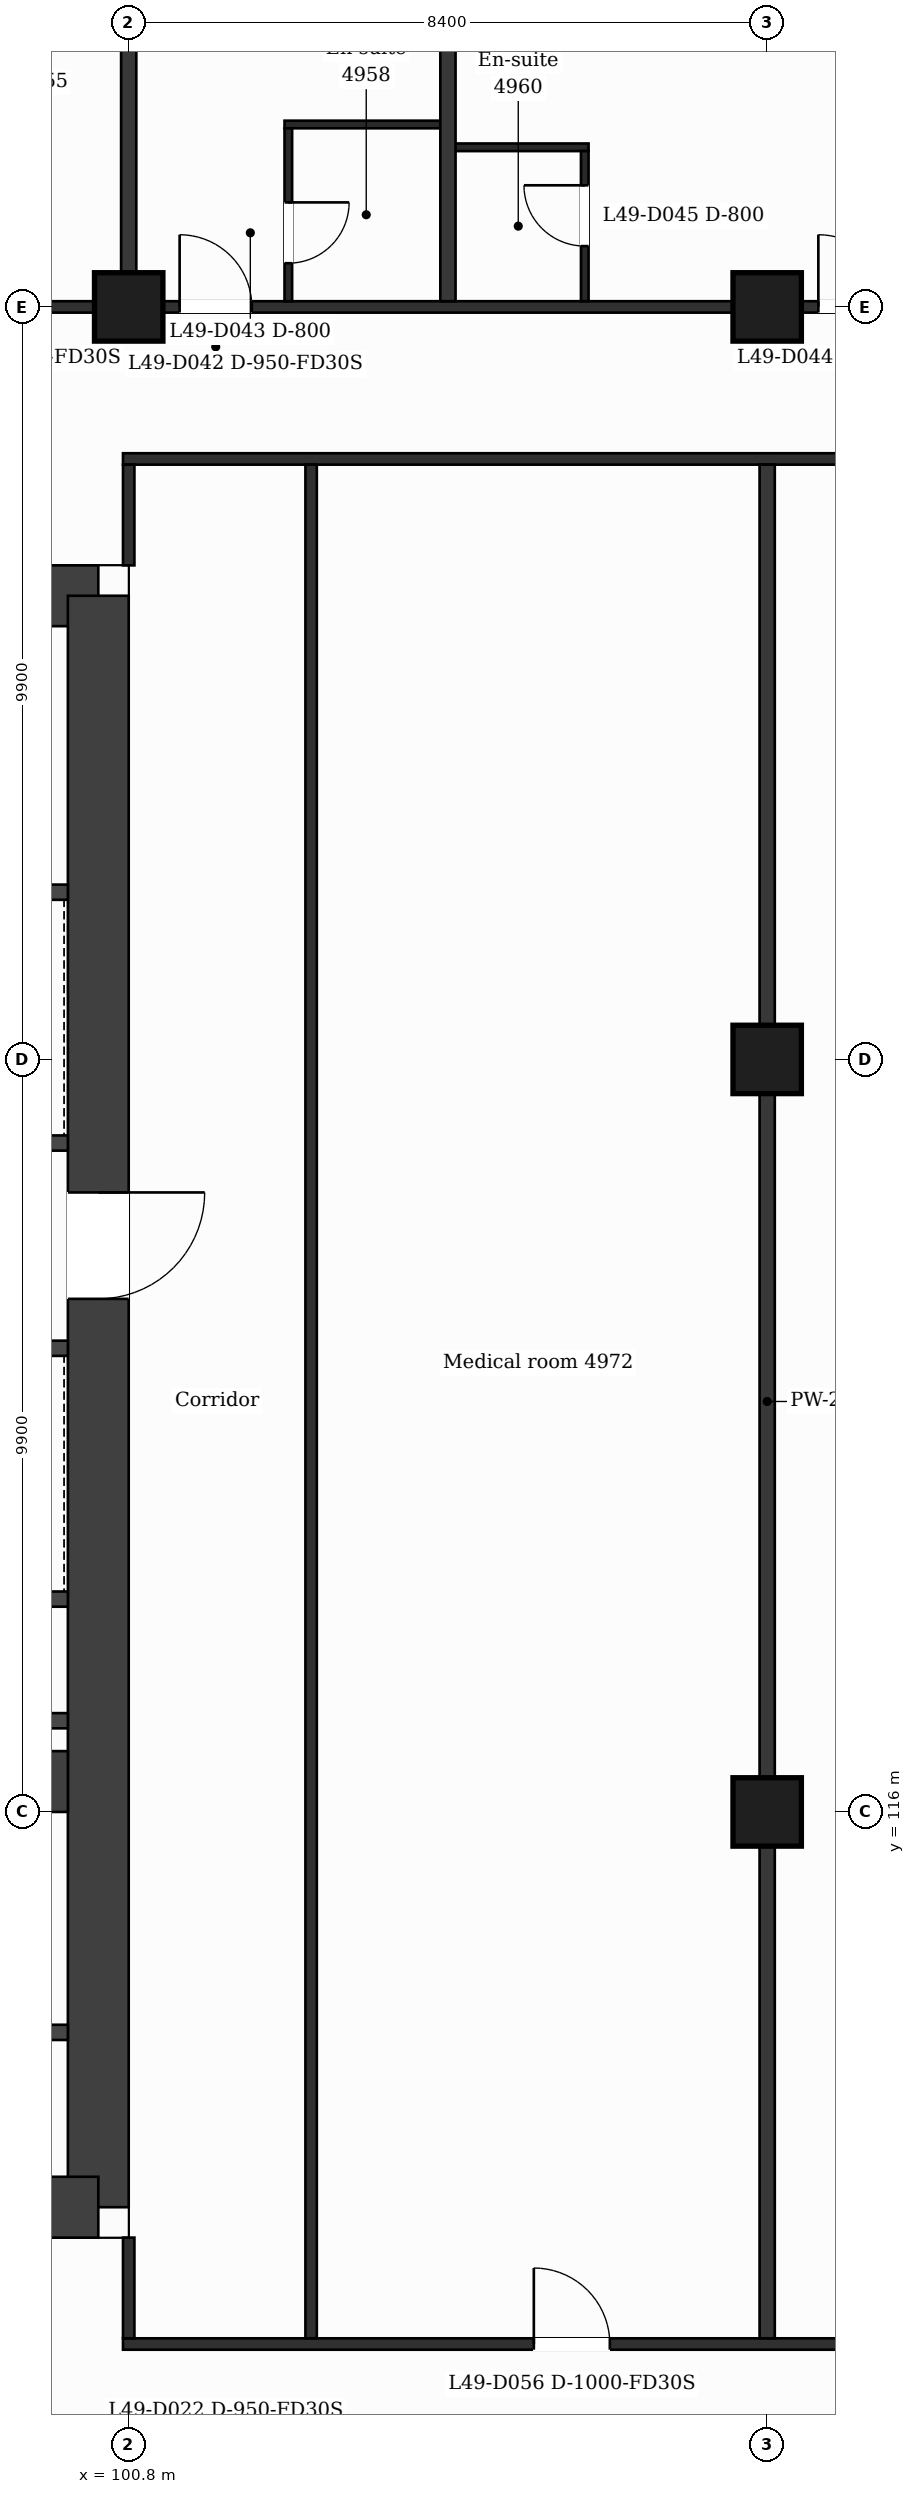
"""IFC4 building model, lengths in metres.
Left out: names, types, materials, properties, quantities, classifications, styles, units other than length and angle.
Written with IfcOpenShell. Run it as: python <this file> out.ifc"""

import sys

from ifc_helpers import new_model, si_unit, direction, frame, frame_2d, origin, origin_2d, place, context, subcontext, project, spatial, rectangle, extrude, element, fill, save


model = new_model("IFC4")
c1 = context("Model", 3, precision=1e-05, world=origin(), true_north=direction((0.0, 1.0)))
c2 = subcontext(c1, "Body", "Model", "MODEL_VIEW")
j1 = project(units=[si_unit("LENGTHUNIT", "METRE"), si_unit("PLANEANGLEUNIT", "RADIAN")], contexts=[c1])
p1 = place(None, origin())
s1 = spatial("IfcSite", under=j1, at=p1, CompositionType="ELEMENT")
p2 = place(p1, origin())
s2 = spatial("IfcBuilding", under=s1, at=p2, CompositionType="ELEMENT")
p3 = place(p2, frame((0.0, 0.0, 205.9)))
s3 = spatial("IfcBuildingStorey", under=s2, at=p3, CompositionType="ELEMENT", Elevation=205.9)
p4 = place(p3, frame((88.98, 132.0, 0.0), z_axis=(0.0, 0.0, 1.0), x_axis=(1.0, 0.0, 0.0)))
e1 = element("IfcWall", 1, at=p4, inside=s3, PredefinedType="SHEAR", context=c2, shape_type="SweptSolid", body=[
    extrude(rectangle(XDim=11.419, YDim=0.8, at=frame_2d((5.71, 0.0))), origin(), (0.0, 0.0, 1.0), 3.7),
])
p5 = place(p4, frame((6.833, 0.0, 0.0)))
e2 = element("IfcOpeningElement", 2, at=p5, cuts=e1, PredefinedType="OPENING", context=c2, shape_type="SweptSolid", body=[
    extrude(rectangle(XDim=1.2, YDim=2.1, at=frame_2d((0.6, 1.05))), frame((0.0, 0.41, 0.0), z_axis=(0.0, -1.0, 0.0), x_axis=(1.0, 0.0, 0.0)), (0.0, 0.0, 1.0), 0.82),
])
p6 = place(p3, frame((100.4, 132.0, 0.0), z_axis=(0.0, 0.0, 1.0), x_axis=(0.0, -1.0, 0.0)))
e3 = element("IfcWall", 3, at=p6, inside=s3, PredefinedType="SHEAR", context=c2, shape_type="SweptSolid", body=[
    extrude(rectangle(XDim=21.2, YDim=0.8, at=frame_2d((10.6, 0.0))), origin(), (0.0, 0.0, 1.0), 3.7),
])
p7 = place(p6, frame((7.85, 0.0, 0.0)))
e4 = element("IfcOpeningElement", 4, at=p7, cuts=e3, PredefinedType="OPENING", context=c2, shape_type="SweptSolid", body=[
    extrude(rectangle(XDim=1.4, YDim=2.1, at=frame_2d((0.7, 1.05))), frame((0.0, 0.41, 0.0), z_axis=(0.0, -1.0, 0.0), x_axis=(1.0, 0.0, 0.0)), (0.0, 0.0, 1.0), 0.82),
])
p8 = place(p3, frame((100.4, 110.8, 0.0), z_axis=(0.0, 0.0, 1.0), x_axis=(-1.0, 0.0, 0.0)))
e5 = element("IfcWall", 5, at=p8, inside=s3, PredefinedType="SHEAR", context=c2, shape_type="SweptSolid", body=[
    extrude(rectangle(XDim=14.273, YDim=0.8, at=frame_2d((7.137, 0.0))), origin(), (0.0, 0.0, 1.0), 3.7),
])
p9 = place(p8, frame((5.908, 0.0, 0.0)))
e6 = element("IfcOpeningElement", 6, at=p9, cuts=e5, PredefinedType="OPENING", context=c2, shape_type="SweptSolid", body=[
    extrude(rectangle(XDim=1.4, YDim=2.1, at=frame_2d((0.7, 1.05))), frame((0.0, 0.41, 0.0), z_axis=(0.0, -1.0, 0.0), x_axis=(1.0, 0.0, 0.0)), (0.0, 0.0, 1.0), 0.82),
])
p10 = place(p3, frame((94.7, 116.4, 0.0), z_axis=(0.0, 0.0, 1.0), x_axis=(1.0, 0.0, 0.0)))
e7 = element("IfcWall", 7, at=p10, inside=s3, PredefinedType="SHEAR", context=c2, shape_type="SweptSolid", body=[
    extrude(rectangle(XDim=5.3, YDim=0.8, at=frame_2d((2.65, 0.0))), origin(), (0.0, 0.0, 1.0), 3.7),
])
for number, where, z_axis, x_axis in (
    (8, (109.2, 116.0, 0.0), (0.0, 0.0, 1.0), (1.0, 0.0, 0.0)),
    (9, (109.2, 125.9, 0.0), (0.0, 0.0, 1.0), (1.0, 0.0, 0.0)),
    (10, (100.8, 135.8, 0.0), (0.0, 0.0, 1.0), (1.0, 0.0, 0.0)),
    (11, (109.2, 135.8, 0.0), (0.0, 0.0, 1.0), (1.0, 0.0, 0.0)),
):
    element("IfcColumn", number, at=place(p3, frame(where, z_axis=z_axis, x_axis=x_axis)), inside=s3, PredefinedType="COLUMN", context=c2, shape_type="SweptSolid", body=[
        extrude(rectangle(XDim=0.9, YDim=0.9, at=origin_2d()), origin(), (0.0, 0.0, 1.0), 3.7),
    ])
p11 = place(p3, frame((100.725, 109.0, 0.0), z_axis=(0.0, 0.0, 1.0), x_axis=(1.0, 0.0, 0.0)))
e12 = element("IfcWall", 12, at=p11, inside=s3, PredefinedType="PARTITIONING", context=c2, shape_type="SweptSolid", body=[
    extrude(rectangle(XDim=25.35, YDim=0.15, at=frame_2d((12.675, 0.0))), origin(), (0.0, 0.0, 1.0), 3.38),
])
p12 = place(p11, frame((20.55, 0.0, 0.0)))
e13 = element("IfcOpeningElement", 13, at=p12, cuts=e12, PredefinedType="OPENING", context=c2, shape_type="SweptSolid", body=[
    extrude(rectangle(XDim=1.0, YDim=2.1, at=frame_2d((0.5, 1.05))), frame((0.0, 0.085, 0.0), z_axis=(0.0, -1.0, 0.0), x_axis=(1.0, 0.0, 0.0)), (0.0, 0.0, 1.0), 0.17),
])
p13 = place(p11, frame((5.405, 0.0, 0.0)))
e14 = element("IfcOpeningElement", 14, at=p13, cuts=e12, PredefinedType="OPENING", context=c2, shape_type="SweptSolid", body=[
    extrude(rectangle(XDim=1.0, YDim=2.1, at=frame_2d((0.5, 1.05))), frame((0.0, 0.085, 0.0), z_axis=(0.0, -1.0, 0.0), x_axis=(1.0, 0.0, 0.0)), (0.0, 0.0, 1.0), 0.17),
])
p14 = place(p11, frame((12.175, 0.0, 0.0)))
e15 = element("IfcOpeningElement", 15, at=p14, cuts=e12, PredefinedType="OPENING", context=c2, shape_type="SweptSolid", body=[
    extrude(rectangle(XDim=1.0, YDim=2.1, at=frame_2d((0.5, 1.05))), frame((0.0, 0.085, 0.0), z_axis=(0.0, -1.0, 0.0), x_axis=(1.0, 0.0, 0.0)), (0.0, 0.0, 1.0), 0.17),
])
p15 = place(p11, frame((17.875, 0.0, 0.0)))
e16 = element("IfcOpeningElement", 16, at=p15, cuts=e12, PredefinedType="OPENING", context=c2, shape_type="SweptSolid", body=[
    extrude(rectangle(XDim=1.0, YDim=2.1, at=frame_2d((0.5, 1.05))), frame((0.0, 0.085, 0.0), z_axis=(0.0, -1.0, 0.0), x_axis=(1.0, 0.0, 0.0)), (0.0, 0.0, 1.0), 0.17),
])
p16 = place(p3, frame((95.127, 113.1, 0.0), z_axis=(0.0, 0.0, 1.0), x_axis=(1.0, 0.0, 0.0)))
e17 = element("IfcWall", 17, at=p16, inside=s3, PredefinedType="PARTITIONING", context=c2, shape_type="SweptSolid", body=[
    extrude(rectangle(XDim=4.873, YDim=0.2, at=frame_2d((2.437, 0.0))), origin(), (0.0, 0.0, 1.0), 3.38),
])
p17 = place(p16, frame((3.23, 0.0, 0.0)))
e18 = element("IfcOpeningElement", 18, at=p17, cuts=e17, PredefinedType="OPENING", context=c2, shape_type="SweptSolid", body=[
    extrude(rectangle(XDim=0.9, YDim=2.1, at=frame_2d((0.45, 1.05))), frame((0.0, 0.11, 0.0), z_axis=(0.0, -1.0, 0.0), x_axis=(1.0, 0.0, 0.0)), (0.0, 0.0, 1.0), 0.22),
])
for number, where, z_axis, x_axis in (
    (19, (95.227, 117.2, 0.0), (0.0, 0.0, 1.0), (1.0, 0.0, 0.0)),
    (20, (95.227, 118.8, 0.0), (0.0, 0.0, 1.0), (1.0, 0.0, 0.0)),
):
    element("IfcWall", number, at=place(p3, frame(where, z_axis=z_axis, x_axis=x_axis)), inside=s3, PredefinedType="PARTITIONING", context=c2, shape_type="SweptSolid", body=[
        extrude(rectangle(XDim=4.773, YDim=0.2, at=frame_2d((2.386, 0.0))), origin(), (0.0, 0.0, 1.0), 3.38),
    ])
p18 = place(p3, frame((95.227, 122.1, 0.0), z_axis=(0.0, 0.0, 1.0), x_axis=(1.0, 0.0, 0.0)))
e21 = element("IfcWall", 21, at=p18, inside=s3, PredefinedType="PARTITIONING", context=c2, shape_type="SweptSolid", body=[
    extrude(rectangle(XDim=4.773, YDim=0.2, at=frame_2d((2.386, 0.0))), origin(), (0.0, 0.0, 1.0), 3.38),
])
p19 = place(p18, frame((0.702, 0.0, 0.0)))
e22 = element("IfcOpeningElement", 22, at=p19, cuts=e21, PredefinedType="OPENING", context=c2, shape_type="SweptSolid", body=[
    extrude(rectangle(XDim=1.1, YDim=2.1, at=frame_2d((0.55, 1.05))), frame((0.0, 0.11, 0.0), z_axis=(0.0, -1.0, 0.0), x_axis=(1.0, 0.0, 0.0)), (0.0, 0.0, 1.0), 0.22),
])
p20 = place(p18, frame((3.176, 0.0, 0.0)))
e23 = element("IfcOpeningElement", 23, at=p20, cuts=e21, PredefinedType="OPENING", context=c2, shape_type="SweptSolid", body=[
    extrude(rectangle(XDim=1.1, YDim=2.1, at=frame_2d((0.55, 1.05))), frame((0.0, 0.11, 0.0), z_axis=(0.0, -1.0, 0.0), x_axis=(1.0, 0.0, 0.0)), (0.0, 0.0, 1.0), 0.22),
])
p21 = place(p3, frame((92.702, 124.8, 0.0), z_axis=(0.0, 0.0, 1.0), x_axis=(1.0, 0.0, 0.0)))
e24 = element("IfcWall", 24, at=p21, inside=s3, PredefinedType="PARTITIONING", context=c2, shape_type="SweptSolid", body=[
    extrude(rectangle(XDim=7.298, YDim=0.2, at=frame_2d((3.649, 0.0))), origin(), (0.0, 0.0, 1.0), 3.38),
])
p22 = place(p21, frame((5.7, 0.0, 0.0)))
e25 = element("IfcOpeningElement", 25, at=p22, cuts=e24, PredefinedType="OPENING", context=c2, shape_type="SweptSolid", body=[
    extrude(rectangle(XDim=1.1, YDim=2.1, at=frame_2d((0.55, 1.05))), frame((0.0, 0.11, 0.0), z_axis=(0.0, -1.0, 0.0), x_axis=(1.0, 0.0, 0.0)), (0.0, 0.0, 1.0), 0.22),
])
p23 = place(p3, frame((92.827, 128.1, 0.0), z_axis=(0.0, 0.0, 1.0), x_axis=(1.0, 0.0, 0.0)))
e26 = element("IfcWall", 26, at=p23, inside=s3, PredefinedType="PARTITIONING", context=c2, shape_type="SweptSolid", body=[
    extrude(rectangle(XDim=7.173, YDim=0.2, at=frame_2d((3.586, 0.0))), origin(), (0.0, 0.0, 1.0), 3.38),
])
p24 = place(p23, frame((2.889, 0.0, 0.0)))
e27 = element("IfcOpeningElement", 27, at=p24, cuts=e26, PredefinedType="OPENING", context=c2, shape_type="SweptSolid", body=[
    extrude(rectangle(XDim=1.1, YDim=2.1, at=frame_2d((0.55, 1.05))), frame((0.0, 0.11, 0.0), z_axis=(0.0, -1.0, 0.0), x_axis=(1.0, 0.0, 0.0)), (0.0, 0.0, 1.0), 0.22),
])
p25 = place(p3, frame((100.725, 133.8, 0.0), z_axis=(0.0, 0.0, 1.0), x_axis=(1.0, 0.0, 0.0)))
e28 = element("IfcWall", 28, at=p25, inside=s3, PredefinedType="PARTITIONING", context=c2, shape_type="SweptSolid", body=[
    extrude(rectangle(XDim=25.35, YDim=0.15, at=frame_2d((12.675, 0.0))), origin(), (0.0, 0.0, 1.0), 3.38),
])
p26 = place(p25, frame((19.375, 0.0, 0.0)))
e29 = element("IfcOpeningElement", 29, at=p26, cuts=e28, PredefinedType="OPENING", context=c2, shape_type="SweptSolid", body=[
    extrude(rectangle(XDim=1.0, YDim=2.1, at=frame_2d((0.5, 1.05))), frame((0.0, 0.085, 0.0), z_axis=(0.0, -1.0, 0.0), x_axis=(1.0, 0.0, 0.0)), (0.0, 0.0, 1.0), 0.17),
])
p27 = place(p3, frame((90.895, 135.8, 0.0), z_axis=(0.0, 0.0, 1.0), x_axis=(1.0, 0.0, 0.0)))
e30 = element("IfcWall", 30, at=p27, inside=s3, PredefinedType="PARTITIONING", context=c2, shape_type="SweptSolid", body=[
    extrude(rectangle(XDim=45.011, YDim=0.15, at=frame_2d((22.505, 0.0))), origin(), (0.0, 0.0, 1.0), 3.38),
])
p28 = place(p27, frame((7.675, 0.0, 0.0)))
e31 = element("IfcOpeningElement", 31, at=p28, cuts=e30, PredefinedType="OPENING", context=c2, shape_type="SweptSolid", body=[
    extrude(rectangle(XDim=1.0, YDim=2.1, at=frame_2d((0.5, 1.05))), frame((0.0, 0.085, 0.0), z_axis=(0.0, -1.0, 0.0), x_axis=(1.0, 0.0, 0.0)), (0.0, 0.0, 1.0), 0.17),
])
p29 = place(p27, frame((10.575, 0.0, 0.0)))
e32 = element("IfcOpeningElement", 32, at=p29, cuts=e30, PredefinedType="OPENING", context=c2, shape_type="SweptSolid", body=[
    extrude(rectangle(XDim=0.95, YDim=2.1, at=frame_2d((0.475, 1.05))), frame((0.0, 0.085, 0.0), z_axis=(0.0, -1.0, 0.0), x_axis=(1.0, 0.0, 0.0)), (0.0, 0.0, 1.0), 0.17),
])
p30 = place(p27, frame((18.979, 0.0, 0.0)))
e33 = element("IfcOpeningElement", 33, at=p30, cuts=e30, PredefinedType="OPENING", context=c2, shape_type="SweptSolid", body=[
    extrude(rectangle(XDim=0.95, YDim=2.1, at=frame_2d((0.475, 1.05))), frame((0.0, 0.085, 0.0), z_axis=(0.0, -1.0, 0.0), x_axis=(1.0, 0.0, 0.0)), (0.0, 0.0, 1.0), 0.17),
])
p31 = place(p27, frame((23.035, 0.0, 0.0)))
e34 = element("IfcOpeningElement", 34, at=p31, cuts=e30, PredefinedType="OPENING", context=c2, shape_type="SweptSolid", body=[
    extrude(rectangle(XDim=0.95, YDim=2.1, at=frame_2d((0.475, 1.05))), frame((0.0, 0.085, 0.0), z_axis=(0.0, -1.0, 0.0), x_axis=(1.0, 0.0, 0.0)), (0.0, 0.0, 1.0), 0.17),
])
p32 = place(p27, frame((29.23, 0.0, 0.0)))
e35 = element("IfcOpeningElement", 35, at=p32, cuts=e30, PredefinedType="OPENING", context=c2, shape_type="SweptSolid", body=[
    extrude(rectangle(XDim=0.95, YDim=2.1, at=frame_2d((0.475, 1.05))), frame((0.0, 0.085, 0.0), z_axis=(0.0, -1.0, 0.0), x_axis=(1.0, 0.0, 0.0)), (0.0, 0.0, 1.0), 0.17),
])
p33 = place(p27, frame((31.367, 0.0, 0.0)))
e36 = element("IfcOpeningElement", 36, at=p33, cuts=e30, PredefinedType="OPENING", context=c2, shape_type="SweptSolid", body=[
    extrude(rectangle(XDim=0.95, YDim=2.1, at=frame_2d((0.475, 1.05))), frame((0.0, 0.085, 0.0), z_axis=(0.0, -1.0, 0.0), x_axis=(1.0, 0.0, 0.0)), (0.0, 0.0, 1.0), 0.17),
])
p34 = place(p27, frame((36.906, 0.0, 0.0)))
e37 = element("IfcOpeningElement", 37, at=p34, cuts=e30, PredefinedType="OPENING", context=c2, shape_type="SweptSolid", body=[
    extrude(rectangle(XDim=1.0, YDim=2.1, at=frame_2d((0.5, 1.05))), frame((0.0, 0.085, 0.0), z_axis=(0.0, -1.0, 0.0), x_axis=(1.0, 0.0, 0.0)), (0.0, 0.0, 1.0), 0.17),
])
p35 = place(p3, frame((105.0, 137.9, 0.0), z_axis=(0.0, 0.0, 1.0), x_axis=(1.0, 0.0, 0.0)))
e38 = element("IfcWall", 38, at=p35, inside=s3, PredefinedType="PARTITIONING", context=c2, shape_type="SweptSolid", body=[
    extrude(rectangle(XDim=1.85, YDim=0.1, at=frame_2d((0.925, 0.0))), origin(), (0.0, 0.0, 1.0), 3.38),
])
p36 = place(p3, frame((102.85, 138.2, 0.0), z_axis=(0.0, 0.0, 1.0), x_axis=(1.0, 0.0, 0.0)))
e39 = element("IfcWall", 39, at=p36, inside=s3, PredefinedType="PARTITIONING", context=c2, shape_type="SweptSolid", body=[
    extrude(rectangle(XDim=2.15, YDim=0.1, at=frame_2d((1.075, 0.0))), origin(), (0.0, 0.0, 1.0), 3.38),
])
p37 = place(p3, frame((100.8, 135.875, 0.0), z_axis=(0.0, 0.0, 1.0), x_axis=(0.0, 1.0, 0.0)))
e40 = element("IfcWall", 40, at=p37, inside=s3, PredefinedType="PARTITIONING", context=c2, shape_type="SweptSolid", body=[
    extrude(rectangle(XDim=7.135, YDim=0.2, at=frame_2d((3.567, 0.0))), origin(), (0.0, 0.0, 1.0), 3.38),
])
p38 = place(p3, frame((100.8, 109.075, 0.0), z_axis=(0.0, 0.0, 1.0), x_axis=(0.0, 1.0, 0.0)))
e41 = element("IfcWall", 41, at=p38, inside=s3, PredefinedType="PARTITIONING", context=c2, shape_type="SweptSolid", body=[
    extrude(rectangle(XDim=1.325, YDim=0.15, at=frame_2d((0.663, 0.0))), origin(), (0.0, 0.0, 1.0), 3.38),
])
p39 = place(p3, frame((100.8, 132.4, 0.0), z_axis=(0.0, 0.0, 1.0), x_axis=(0.0, 1.0, 0.0)))
e42 = element("IfcWall", 42, at=p39, inside=s3, PredefinedType="PARTITIONING", context=c2, shape_type="SweptSolid", body=[
    extrude(rectangle(XDim=1.325, YDim=0.15, at=frame_2d((0.663, 0.0))), origin(), (0.0, 0.0, 1.0), 3.38),
])
p40 = place(p3, frame((102.9, 135.875, 0.0), z_axis=(0.0, 0.0, 1.0), x_axis=(0.0, 1.0, 0.0)))
e43 = element("IfcWall", 43, at=p40, inside=s3, PredefinedType="PARTITIONING", context=c2, shape_type="SweptSolid", body=[
    extrude(rectangle(XDim=2.275, YDim=0.1, at=frame_2d((1.137, 0.0))), origin(), (0.0, 0.0, 1.0), 3.38),
])
p41 = place(p40, frame((0.5, 0.0, 0.0)))
e44 = element("IfcOpeningElement", 44, at=p41, cuts=e43, PredefinedType="OPENING", context=c2, shape_type="SweptSolid", body=[
    extrude(rectangle(XDim=0.8, YDim=2.1, at=frame_2d((0.4, 1.05))), frame((0.0, 0.06, 0.0), z_axis=(0.0, -1.0, 0.0), x_axis=(1.0, 0.0, 0.0)), (0.0, 0.0, 1.0), 0.12),
])
p42 = place(p3, frame((103.2, 109.075, 0.0), z_axis=(0.0, 0.0, 1.0), x_axis=(0.0, 1.0, 0.0)))
e45 = element("IfcWall", 45, at=p42, inside=s3, PredefinedType="PARTITIONING", context=c2, shape_type="SweptSolid", body=[
    extrude(rectangle(XDim=24.65, YDim=0.15, at=frame_2d((12.325, 0.0))), origin(), (0.0, 0.0, 1.0), 3.38),
])
p43 = place(p3, frame((105.0, 135.875, 0.0), z_axis=(0.0, 0.0, 1.0), x_axis=(0.0, 1.0, 0.0)))
e46 = element("IfcWall", 46, at=p43, inside=s3, PredefinedType="PARTITIONING", context=c2, shape_type="SweptSolid", body=[
    extrude(rectangle(XDim=7.135, YDim=0.2, at=frame_2d((3.567, 0.0))), origin(), (0.0, 0.0, 1.0), 3.38),
])
p44 = place(p3, frame((106.8, 135.875, 0.0), z_axis=(0.0, 0.0, 1.0), x_axis=(0.0, 1.0, 0.0)))
e47 = element("IfcWall", 47, at=p44, inside=s3, PredefinedType="PARTITIONING", context=c2, shape_type="SweptSolid", body=[
    extrude(rectangle(XDim=1.975, YDim=0.1, at=frame_2d((0.988, 0.0))), origin(), (0.0, 0.0, 1.0), 3.38),
])
p45 = place(p44, frame((0.725, 0.0, 0.0)))
e48 = element("IfcOpeningElement", 48, at=p45, cuts=e47, PredefinedType="OPENING", context=c2, shape_type="SweptSolid", body=[
    extrude(rectangle(XDim=0.8, YDim=2.1, at=frame_2d((0.4, 1.05))), frame((0.0, 0.06, 0.0), z_axis=(0.0, -1.0, 0.0), x_axis=(1.0, 0.0, 0.0)), (0.0, 0.0, 1.0), 0.12),
])
p46 = place(p3, frame((109.2, 109.075, 0.0), z_axis=(0.0, 0.0, 1.0), x_axis=(0.0, 1.0, 0.0)))
e49 = element("IfcWall", 49, at=p46, inside=s3, PredefinedType="PARTITIONING", context=c2, shape_type="SweptSolid", body=[
    extrude(rectangle(XDim=24.65, YDim=0.2, at=frame_2d((12.325, 0.0))), origin(), (0.0, 0.0, 1.0), 3.38),
])
p47 = place(p29, origin())
e50 = element("IfcDoor", 50, at=p47, inside=s3, OperationType="SINGLE_SWING_LEFT", PredefinedType="DOOR", context=c2, shape_type="SweptSolid", body=[
    extrude(rectangle(XDim=0.95, YDim=2.1, at=frame_2d((0.475, 1.05))), frame((0.0, 0.025, 0.0), z_axis=(0.0, -1.0, 0.0), x_axis=(1.0, 0.0, 0.0)), (0.0, 0.0, 1.0), 0.05),
])
fill(e32, e50)
p48 = place(p41, origin())
e51 = element("IfcDoor", 51, at=p48, inside=s3, OperationType="SINGLE_SWING_RIGHT", PredefinedType="DOOR", context=c2, shape_type="SweptSolid", body=[
    extrude(rectangle(XDim=0.8, YDim=2.1, at=frame_2d((0.4, 1.05))), frame((0.0, 0.025, 0.0), z_axis=(0.0, -1.0, 0.0), x_axis=(1.0, 0.0, 0.0)), (0.0, 0.0, 1.0), 0.05),
])
fill(e44, e51)
p49 = place(p30, origin())
e52 = element("IfcDoor", 52, at=p49, inside=s3, OperationType="SINGLE_SWING_LEFT", PredefinedType="DOOR", context=c2, shape_type="SweptSolid", body=[
    extrude(rectangle(XDim=0.95, YDim=2.1, at=frame_2d((0.475, 1.05))), frame((0.0, 0.025, 0.0), z_axis=(0.0, -1.0, 0.0), x_axis=(1.0, 0.0, 0.0)), (0.0, 0.0, 1.0), 0.05),
])
fill(e33, e52)
p50 = place(p45, origin())
e53 = element("IfcDoor", 53, at=p50, inside=s3, OperationType="SINGLE_SWING_RIGHT", PredefinedType="DOOR", context=c2, shape_type="SweptSolid", body=[
    extrude(rectangle(XDim=0.8, YDim=2.1, at=frame_2d((0.4, 1.05))), frame((0.0, 0.025, 0.0), z_axis=(0.0, -1.0, 0.0), x_axis=(1.0, 0.0, 0.0)), (0.0, 0.0, 1.0), 0.05),
])
fill(e48, e53)
p51 = place(p13, origin())
e54 = element("IfcDoor", 54, at=p51, inside=s3, OperationType="SINGLE_SWING_LEFT", PredefinedType="DOOR", context=c2, shape_type="SweptSolid", body=[
    extrude(rectangle(XDim=1.0, YDim=2.1, at=frame_2d((0.5, 1.05))), frame((0.0, 0.025, 0.0), z_axis=(0.0, -1.0, 0.0), x_axis=(1.0, 0.0, 0.0)), (0.0, 0.0, 1.0), 0.05),
])
fill(e14, e54)
p52 = place(p7, origin())
e55 = element("IfcDoor", 55, at=p52, inside=s3, OperationType="SINGLE_SWING_LEFT", PredefinedType="DOOR", context=c2, shape_type="SweptSolid", body=[
    extrude(rectangle(XDim=1.4, YDim=2.1, at=frame_2d((0.7, 1.05))), frame((0.0, 0.025, 0.0), z_axis=(0.0, -1.0, 0.0), x_axis=(1.0, 0.0, 0.0)), (0.0, 0.0, 1.0), 0.05),
])
fill(e4, e55)
save(model, sys.argv[1])
